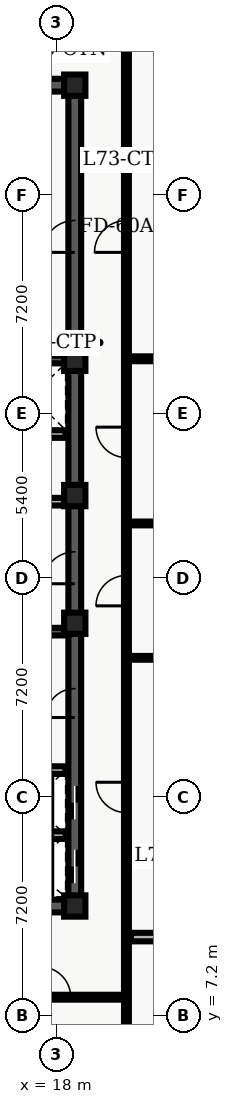
"""IFC4 building model, lengths in metres.
Left out: names, types, materials, properties, quantities, classifications, styles, units other than length and angle.
Written with IfcOpenShell. Run it as: python <this file> out.ifc"""

import sys

from ifc_helpers import new_model, entity, si_unit, converted_unit, direction, frame, origin_with_axes, origin_2d_with_axis, place, context, subcontext, project, spatial, polyline, rectangle, outline, extrude, element, fill, save


model = new_model("IFC4")
c1 = context("Model", 3, precision=1e-05, world=origin_with_axes(), true_north=direction((0.0, 1.0)))
c2 = subcontext(c1, "Body", "Model", "MODEL_VIEW")
j1 = project(units=[si_unit("LENGTHUNIT", "METRE"), converted_unit("PLANEANGLEUNIT", "DEGREE", entity("IfcPlaneAngleMeasure", 0.017), si_unit("PLANEANGLEUNIT", "RADIAN"), dimensions=[0, 0, 0, 0, 0, 0, 0])], contexts=[c1])
p1 = place(None, origin_with_axes())
s1 = spatial("IfcSite", under=j1, at=p1, CompositionType="ELEMENT")
p2 = place(p1, origin_with_axes())
s2 = spatial("IfcBuilding", under=s1, at=p2, CompositionType="ELEMENT")
p3 = place(p2, frame((0.0, 0.0, 295.8), z_axis=(0.0, 0.0, 1.0), x_axis=(1.0, 0.0, 0.0)))
s3 = spatial("IfcBuildingStorey", under=s2, at=p3, CompositionType="ELEMENT", Elevation=295.8)
p4 = place(p3, frame((11.4, 10.8, 0.0), z_axis=(0.0, 0.0, 1.0), x_axis=(1.0, 0.0, 0.0)))
e1 = element("IfcWall", 1, at=p4, inside=s3, PredefinedType="SHEAR", context=c2, shape_type="SweptSolid", body=[
    extrude(outline(polyline([(0.0, -0.21), (7.2, -0.21), (7.2, 0.21), (0.0, 0.21), (0.0, -0.21)])), origin_with_axes(), (0.0, 0.0, 1.0), 3.66),
])
p5 = place(p4, frame((2.625, 0.0, 0.0), z_axis=(0.0, 0.0, 1.0), x_axis=(1.0, 0.0, 0.0)))
e2 = element("IfcOpeningElement", 2, at=p5, cuts=e1, PredefinedType="OPENING", context=c2, shape_type="SweptSolid", body=[
    extrude(rectangle(XDim=1.05, YDim=0.44, at=origin_2d_with_axis()), origin_with_axes(), (0.0, 0.0, 1.0), 2.15),
])
p6 = place(p3, frame((11.4, 37.8, 0.0), z_axis=(0.0, 0.0, 1.0), x_axis=(1.0, 0.0, 0.0)))
e3 = element("IfcWall", 3, at=p6, inside=s3, PredefinedType="SHEAR", context=c2, shape_type="SweptSolid", body=[
    extrude(outline(polyline([(0.0, -0.21), (7.2, -0.21), (7.2, 0.21), (0.0, 0.21), (0.0, -0.21)])), origin_with_axes(), (0.0, 0.0, 1.0), 3.66),
])
p7 = place(p6, frame((2.625, 0.0, 0.0), z_axis=(0.0, 0.0, 1.0), x_axis=(1.0, 0.0, 0.0)))
e4 = element("IfcOpeningElement", 4, at=p7, cuts=e3, PredefinedType="OPENING", context=c2, shape_type="SweptSolid", body=[
    extrude(rectangle(XDim=1.05, YDim=0.44, at=origin_2d_with_axis()), origin_with_axes(), (0.0, 0.0, 1.0), 2.15),
])
p8 = place(p3, frame((18.6, 10.8, 0.0), z_axis=(0.0, 0.0, 1.0), x_axis=(0.0, 1.0, 0.0)))
e5 = element("IfcWall", 5, at=p8, inside=s3, PredefinedType="SHEAR", context=c2, shape_type="SweptSolid", body=[
    extrude(outline(polyline([(0.0, -0.21), (13.5, -0.21), (13.5, 0.21), (0.0, 0.21), (0.0, -0.21)])), origin_with_axes(), (0.0, 0.0, 1.0), 3.66),
])
p9 = place(p8, frame((1.3, 0.0, 0.0), z_axis=(0.0, 0.0, 1.0), x_axis=(1.0, 0.0, 0.0)))
e6 = element("IfcOpeningElement", 6, at=p9, cuts=e5, PredefinedType="OPENING", context=c2, shape_type="SweptSolid", body=[
    extrude(rectangle(XDim=1.1, YDim=0.44, at=origin_2d_with_axis()), origin_with_axes(), (0.0, 0.0, 1.0), 2.15),
])
p10 = place(p8, frame((3.4, 0.0, 0.0), z_axis=(0.0, 0.0, 1.0), x_axis=(1.0, 0.0, 0.0)))
e7 = element("IfcOpeningElement", 7, at=p10, cuts=e5, PredefinedType="OPENING", context=c2, shape_type="SweptSolid", body=[
    extrude(rectangle(XDim=1.1, YDim=0.44, at=origin_2d_with_axis()), origin_with_axes(), (0.0, 0.0, 1.0), 2.15),
])
p11 = place(p8, frame((11.125, 0.0, 0.0), z_axis=(0.0, 0.0, 1.0), x_axis=(1.0, 0.0, 0.0)))
e8 = element("IfcOpeningElement", 8, at=p11, cuts=e5, PredefinedType="OPENING", context=c2, shape_type="SweptSolid", body=[
    extrude(rectangle(XDim=1.05, YDim=0.44, at=origin_2d_with_axis()), origin_with_axes(), (0.0, 0.0, 1.0), 2.15),
])
p12 = place(p8, frame((6.675, 0.0, 0.0), z_axis=(0.0, 0.0, 1.0), x_axis=(1.0, 0.0, 0.0)))
e9 = element("IfcOpeningElement", 9, at=p12, cuts=e5, PredefinedType="OPENING", context=c2, shape_type="SweptSolid", body=[
    extrude(rectangle(XDim=0.95, YDim=0.44, at=origin_2d_with_axis()), origin_with_axes(), (0.0, 0.0, 1.0), 2.15),
])
p13 = place(p3, frame((18.6, 24.3, 0.0), z_axis=(0.0, 0.0, 1.0), x_axis=(0.0, 1.0, 0.0)))
e10 = element("IfcWall", 10, at=p13, inside=s3, PredefinedType="SHEAR", context=c2, shape_type="SweptSolid", body=[
    extrude(outline(polyline([(0.0, -0.21), (13.5, -0.21), (13.5, 0.21), (0.0, 0.21), (0.0, -0.21)])), origin_with_axes(), (0.0, 0.0, 1.0), 3.66),
])
p14 = place(p13, frame((8.525, 0.0, 0.0), z_axis=(0.0, 0.0, 1.0), x_axis=(1.0, 0.0, 0.0)))
e11 = element("IfcOpeningElement", 11, at=p14, cuts=e10, PredefinedType="OPENING", context=c2, shape_type="SweptSolid", body=[
    extrude(rectangle(XDim=1.05, YDim=0.44, at=origin_2d_with_axis()), origin_with_axes(), (0.0, 0.0, 1.0), 2.15),
])
for number, where, z_axis, x_axis in (
    (12, (11.61, 19.825, 0.0), (0.0, 0.0, 1.0), (1.0, 0.0, 0.0)),
    (13, (11.61, 28.775, 0.0), (0.0, 0.0, 1.0), (1.0, 0.0, 0.0)),
):
    element("IfcWall", number, at=place(p3, frame(where, z_axis=z_axis, x_axis=x_axis)), inside=s3, PredefinedType="SHEAR", context=c2, shape_type="SweptSolid", body=[
        extrude(outline(polyline([(0.0, -0.125), (6.78, -0.125), (6.78, 0.125), (0.0, 0.125), (0.0, -0.125)])), origin_with_axes(), (0.0, 0.0, 1.0), 3.66),
    ])
p15 = place(p3, frame((11.7, 24.1, 0.0), z_axis=(0.0, 0.0, 1.0), x_axis=(1.0, 0.0, 0.0)))
e14 = element("IfcWall", 14, at=p15, inside=s3, PredefinedType="SOLIDWALL", context=c2, shape_type="SweptSolid", body=[
    extrude(outline(polyline([(0.0, -0.125), (6.6, -0.125), (6.6, 0.125), (0.0, 0.125), (0.0, -0.125)])), origin_with_axes(), (0.0, 0.0, 1.0), 2.7),
])
p16 = place(p15, frame((3.75, 0.0, 0.0), z_axis=(0.0, 0.0, 1.0), x_axis=(1.0, 0.0, 0.0)))
e15 = element("IfcOpeningElement", 15, at=p16, cuts=e14, PredefinedType="OPENING", context=c2, shape_type="SweptSolid", body=[
    extrude(rectangle(XDim=0.9, YDim=0.27, at=origin_2d_with_axis()), origin_with_axes(), (0.0, 0.0, 1.0), 2.15),
])
p17 = place(p3, frame((11.7, 26.325, 0.0), z_axis=(0.0, 0.0, 1.0), x_axis=(1.0, 0.0, 0.0)))
e16 = element("IfcWall", 16, at=p17, inside=s3, PredefinedType="SOLIDWALL", context=c2, shape_type="SweptSolid", body=[
    extrude(outline(polyline([(0.0, -0.125), (6.6, -0.125), (6.6, 0.125), (0.0, 0.125), (0.0, -0.125)])), origin_with_axes(), (0.0, 0.0, 1.0), 2.7),
])
p18 = place(p17, frame((3.5, 0.0, 0.0), z_axis=(0.0, 0.0, 1.0), x_axis=(1.0, 0.0, 0.0)))
e17 = element("IfcOpeningElement", 17, at=p18, cuts=e16, PredefinedType="OPENING", context=c2, shape_type="SweptSolid", body=[
    extrude(rectangle(XDim=0.9, YDim=0.27, at=origin_2d_with_axis()), origin_with_axes(), (0.0, 0.0, 1.0), 2.15),
])
for number, where, z_axis, x_axis in (
    (18, (18.6, 10.8, 0.0), (0.0, 0.0, 1.0), (1.0, 0.0, 0.0)),
    (19, (18.6, 20.1, 0.0), (0.0, 0.0, 1.0), (1.0, 0.0, 0.0)),
    (20, (18.6, 24.3, 0.0), (0.0, 0.0, 1.0), (1.0, 0.0, 0.0)),
    (21, (18.6, 28.75, 0.0), (0.0, 0.0, 1.0), (1.0, 0.0, 0.0)),
    (22, (18.6, 37.8, 0.0), (0.0, 0.0, 1.0), (1.0, 0.0, 0.0)),
):
    element("IfcColumn", number, at=place(p3, frame(where, z_axis=z_axis, x_axis=x_axis)), inside=s3, PredefinedType="COLUMN", context=c2, shape_type="SweptSolid", body=[
        extrude(rectangle(XDim=0.7, YDim=0.7, at=origin_2d_with_axis()), origin_with_axes(), (0.0, 0.0, 1.0), 3.9),
    ])
for number, where, z_axis, x_axis in (
    (23, (15.84, 13.13, 0.0), (0.0, 0.0, 1.0), (1.0, 0.0, 0.0)),
    (24, (15.84, 15.27, 0.0), (0.0, 0.0, 1.0), (1.0, 0.0, 0.0)),
):
    element("IfcWall", number, at=place(p3, frame(where, z_axis=z_axis, x_axis=x_axis)), inside=s3, PredefinedType="SOLIDWALL", context=c2, shape_type="SweptSolid", body=[
        extrude(outline(polyline([(0.0, -0.125), (2.46, -0.125), (2.46, 0.125), (0.0, 0.125), (0.0, -0.125)])), origin_with_axes(), (0.0, 0.0, 1.0), 2.7),
    ])
p19 = place(p3, frame((8.135, 7.8, 0.0), z_axis=(0.0, 0.0, 1.0), x_axis=(1.0, 0.0, 0.0)))
e25 = element("IfcWall", 25, at=p19, inside=s3, PredefinedType="PARTITIONING", context=c2, shape_type="SweptSolid", body=[
    extrude(outline(polyline([(0.0, -0.08), (12.165, -0.08), (12.165, 0.08), (0.0, 0.08), (0.0, -0.08)])), origin_with_axes(), (0.0, 0.0, 1.0), 2.7),
])
p20 = place(p19, frame((0.908, 0.0, 0.0), z_axis=(0.0, 0.0, 1.0), x_axis=(1.0, 0.0, 0.0)))
e26 = element("IfcOpeningElement", 26, at=p20, cuts=e25, PredefinedType="OPENING", context=c2, shape_type="SweptSolid", body=[
    extrude(rectangle(XDim=1.0, YDim=0.18, at=origin_2d_with_axis()), origin_with_axes(), (0.0, 0.0, 1.0), 2.15),
])
p21 = place(p19, frame((5.556, 0.0, 0.0), z_axis=(0.0, 0.0, 1.0), x_axis=(1.0, 0.0, 0.0)))
e27 = element("IfcOpeningElement", 27, at=p21, cuts=e25, PredefinedType="OPENING", context=c2, shape_type="SweptSolid", body=[
    extrude(rectangle(XDim=1.0, YDim=0.18, at=origin_2d_with_axis()), origin_with_axes(), (0.0, 0.0, 1.0), 2.15),
])
p22 = place(p19, frame((9.832, 0.0, 0.0), z_axis=(0.0, 0.0, 1.0), x_axis=(1.0, 0.0, 0.0)))
e28 = element("IfcOpeningElement", 28, at=p22, cuts=e25, PredefinedType="OPENING", context=c2, shape_type="SweptSolid", body=[
    extrude(rectangle(XDim=1.0, YDim=0.18, at=origin_2d_with_axis()), origin_with_axes(), (0.0, 0.0, 1.0), 2.15),
])
p23 = place(p3, frame((20.3, 2.14, 0.0), z_axis=(0.0, 0.0, 1.0), x_axis=(0.0, 1.0, 0.0)))
e29 = element("IfcWall", 29, at=p23, inside=s3, PredefinedType="PARTITIONING", context=c2, shape_type="SweptSolid", body=[
    extrude(outline(polyline([(0.0, -0.08), (38.36, -0.08), (38.36, 0.08), (0.0, 0.08), (0.0, -0.08)])), origin_with_axes(), (0.0, 0.0, 1.0), 2.7),
])
p24 = place(p23, frame((30.685, 0.0, 0.0), z_axis=(0.0, 0.0, 1.0), x_axis=(1.0, 0.0, 0.0)))
e30 = element("IfcOpeningElement", 30, at=p24, cuts=e29, PredefinedType="OPENING", context=c2, shape_type="SweptSolid", body=[
    extrude(rectangle(XDim=1.05, YDim=0.18, at=origin_2d_with_axis()), origin_with_axes(), (0.0, 0.0, 1.0), 2.15),
])
p25 = place(p23, frame((3.524, 0.0, 0.0), z_axis=(0.0, 0.0, 1.0), x_axis=(1.0, 0.0, 0.0)))
e31 = element("IfcOpeningElement", 31, at=p25, cuts=e29, PredefinedType="OPENING", context=c2, shape_type="SweptSolid", body=[
    extrude(rectangle(XDim=1.0, YDim=0.18, at=origin_2d_with_axis()), origin_with_axes(), (0.0, 0.0, 1.0), 2.15),
])
p26 = place(p23, frame((12.23, 0.0, 0.0), z_axis=(0.0, 0.0, 1.0), x_axis=(1.0, 0.0, 0.0)))
e32 = element("IfcOpeningElement", 32, at=p26, cuts=e29, PredefinedType="OPENING", context=c2, shape_type="SweptSolid", body=[
    extrude(rectangle(XDim=1.0, YDim=0.18, at=origin_2d_with_axis()), origin_with_axes(), (0.0, 0.0, 1.0), 2.15),
])
p27 = place(p23, frame((19.033, 0.0, 0.0), z_axis=(0.0, 0.0, 1.0), x_axis=(1.0, 0.0, 0.0)))
e33 = element("IfcOpeningElement", 33, at=p27, cuts=e29, PredefinedType="OPENING", context=c2, shape_type="SweptSolid", body=[
    extrude(rectangle(XDim=1.0, YDim=0.18, at=origin_2d_with_axis()), origin_with_axes(), (0.0, 0.0, 1.0), 2.15),
])
p28 = place(p23, frame((23.912, 0.0, 0.0), z_axis=(0.0, 0.0, 1.0), x_axis=(1.0, 0.0, 0.0)))
e34 = element("IfcOpeningElement", 34, at=p28, cuts=e29, PredefinedType="OPENING", context=c2, shape_type="SweptSolid", body=[
    extrude(rectangle(XDim=1.0, YDim=0.18, at=origin_2d_with_axis()), origin_with_axes(), (0.0, 0.0, 1.0), 2.15),
])
p29 = place(p3, frame((20.3, 28.8, 0.0), z_axis=(0.0, 0.0, 1.0), x_axis=(1.0, 0.0, 0.0)))
e35 = element("IfcWall", 35, at=p29, inside=s3, PredefinedType="PARTITIONING", context=c2, shape_type="SweptSolid", body=[
    extrude(outline(polyline([(0.0, -0.08), (3.32, -0.08), (3.32, 0.08), (0.0, 0.08), (0.0, -0.08)])), origin_with_axes(), (0.0, 0.0, 1.0), 2.7),
])
p30 = place(p3, frame((20.45, 9.778, 0.0), z_axis=(0.0, 0.0, 1.0), x_axis=(1.0, 0.0, 0.0)))
e36 = element("IfcWall", 36, at=p30, inside=s3, PredefinedType="PARTITIONING", context=c2, shape_type="SweptSolid", body=[
    extrude(outline(polyline([(0.0, -0.14), (13.415, -0.14), (13.415, 0.14), (0.0, 0.14), (0.0, -0.14)])), origin_with_axes(), (0.0, 0.0, 1.0), 2.7),
])
p31 = place(p3, frame((20.45, 18.963, 0.0), z_axis=(0.0, 0.0, 1.0), x_axis=(1.0, 0.0, 0.0)))
e37 = element("IfcWall", 37, at=p31, inside=s3, PredefinedType="PARTITIONING", context=c2, shape_type="SweptSolid", body=[
    extrude(outline(polyline([(0.0, -0.062), (13.415, -0.062), (13.415, 0.062), (0.0, 0.062), (0.0, -0.062)])), origin_with_axes(), (0.0, 0.0, 1.0), 2.7),
])
p32 = place(p3, frame((20.45, 23.383, 0.0), z_axis=(0.0, 0.0, 1.0), x_axis=(1.0, 0.0, 0.0)))
e38 = element("IfcWall", 38, at=p32, inside=s3, PredefinedType="PARTITIONING", context=c2, shape_type="SweptSolid", body=[
    extrude(outline(polyline([(0.0, -0.062), (13.35, -0.062), (13.35, 0.062), (0.0, 0.062), (0.0, -0.062)])), origin_with_axes(), (0.0, 0.0, 1.0), 2.7),
])
p33 = place(p8, frame((1.3, 0.0, 0.0), z_axis=(0.0, 0.0, 1.0), x_axis=(1.0, 0.0, 0.0)))
e39 = element("IfcDoor", 39, at=p33, inside=s3, OperationType="SLIDING_TO_LEFT", PredefinedType="DOOR", context=c2, shape_type="SweptSolid", body=[
    extrude(rectangle(XDim=1.1, YDim=0.09, at=origin_2d_with_axis()), origin_with_axes(), (0.0, 0.0, 1.0), 2.15),
])
fill(e6, e39)
p34 = place(p8, frame((3.4, 0.0, 0.0), z_axis=(0.0, 0.0, 1.0), x_axis=(1.0, 0.0, 0.0)))
e40 = element("IfcDoor", 40, at=p34, inside=s3, OperationType="SLIDING_TO_RIGHT", PredefinedType="DOOR", context=c2, shape_type="SweptSolid", body=[
    extrude(rectangle(XDim=1.1, YDim=0.09, at=origin_2d_with_axis()), origin_with_axes(), (0.0, 0.0, 1.0), 2.15),
])
fill(e7, e40)
p35 = place(p8, frame((11.125, 0.0, 0.0), z_axis=(0.0, 0.0, 1.0), x_axis=(1.0, 0.0, 0.0)))
e41 = element("IfcDoor", 41, at=p35, inside=s3, OperationType="SINGLE_SWING_LEFT", PredefinedType="DOOR", context=c2, shape_type="SweptSolid", body=[
    extrude(rectangle(XDim=1.05, YDim=0.09, at=origin_2d_with_axis()), origin_with_axes(), (0.0, 0.0, 1.0), 2.15),
])
fill(e8, e41)
p36 = place(p8, frame((6.675, 0.0, 0.0), z_axis=(0.0, 0.0, 1.0), x_axis=(1.0, 0.0, 0.0)))
e42 = element("IfcDoor", 42, at=p36, inside=s3, OperationType="SINGLE_SWING_LEFT", PredefinedType="DOOR", context=c2, shape_type="SweptSolid", body=[
    extrude(rectangle(XDim=0.95, YDim=0.09, at=origin_2d_with_axis()), origin_with_axes(), (0.0, 0.0, 1.0), 2.15),
])
fill(e9, e42)
p37 = place(p13, frame((8.525, 0.0, 0.0), z_axis=(0.0, 0.0, 1.0), x_axis=(1.0, 0.0, 0.0)))
e43 = element("IfcDoor", 43, at=p37, inside=s3, OperationType="SINGLE_SWING_LEFT", PredefinedType="DOOR", context=c2, shape_type="SweptSolid", body=[
    extrude(rectangle(XDim=1.05, YDim=0.09, at=origin_2d_with_axis()), origin_with_axes(), (0.0, 0.0, 1.0), 2.15),
])
fill(e11, e43)
p38 = place(p23, frame((30.685, 0.0, 0.0), z_axis=(0.0, 0.0, 1.0), x_axis=(1.0, 0.0, 0.0)))
e44 = element("IfcDoor", 44, at=p38, inside=s3, OperationType="SINGLE_SWING_LEFT", PredefinedType="DOOR", context=c2, shape_type="SweptSolid", body=[
    extrude(rectangle(XDim=1.05, YDim=0.09, at=origin_2d_with_axis()), origin_with_axes(), (0.0, 0.0, 1.0), 2.15),
])
fill(e30, e44)
p39 = place(p19, frame((9.832, 0.0, 0.0), z_axis=(0.0, 0.0, 1.0), x_axis=(1.0, 0.0, 0.0)))
e45 = element("IfcDoor", 45, at=p39, inside=s3, OperationType="SINGLE_SWING_LEFT", PredefinedType="DOOR", context=c2, shape_type="SweptSolid", body=[
    extrude(rectangle(XDim=1.0, YDim=0.09, at=origin_2d_with_axis()), origin_with_axes(), (0.0, 0.0, 1.0), 2.15),
])
fill(e28, e45)
p40 = place(p23, frame((12.23, 0.0, 0.0), z_axis=(0.0, 0.0, 1.0), x_axis=(1.0, 0.0, 0.0)))
e46 = element("IfcDoor", 46, at=p40, inside=s3, OperationType="SINGLE_SWING_RIGHT", PredefinedType="DOOR", context=c2, shape_type="SweptSolid", body=[
    extrude(rectangle(XDim=1.0, YDim=0.09, at=origin_2d_with_axis()), origin_with_axes(), (0.0, 0.0, 1.0), 2.15),
])
fill(e32, e46)
p41 = place(p23, frame((19.033, 0.0, 0.0), z_axis=(0.0, 0.0, 1.0), x_axis=(1.0, 0.0, 0.0)))
e47 = element("IfcDoor", 47, at=p41, inside=s3, OperationType="SINGLE_SWING_LEFT", PredefinedType="DOOR", context=c2, shape_type="SweptSolid", body=[
    extrude(rectangle(XDim=1.0, YDim=0.09, at=origin_2d_with_axis()), origin_with_axes(), (0.0, 0.0, 1.0), 2.15),
])
fill(e33, e47)
p42 = place(p23, frame((23.912, 0.0, 0.0), z_axis=(0.0, 0.0, 1.0), x_axis=(1.0, 0.0, 0.0)))
e48 = element("IfcDoor", 48, at=p42, inside=s3, OperationType="SINGLE_SWING_RIGHT", PredefinedType="DOOR", context=c2, shape_type="SweptSolid", body=[
    extrude(rectangle(XDim=1.0, YDim=0.09, at=origin_2d_with_axis()), origin_with_axes(), (0.0, 0.0, 1.0), 2.15),
])
fill(e34, e48)
save(model, sys.argv[1])
